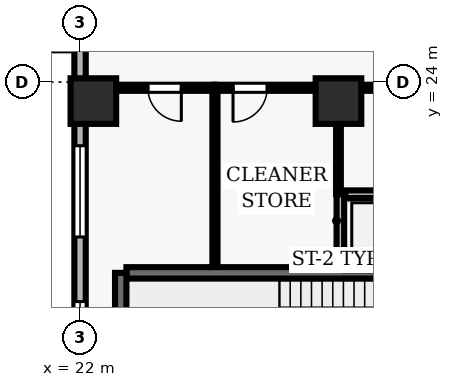
"""IFC4 building model, lengths in metres.
Left out: names, types, materials, properties, quantities, classifications, styles, units other than length and angle.
Written with IfcOpenShell. Run it as: python <this file> out.ifc"""

import sys

from ifc_helpers import new_model, si_unit, direction, frame, frame_2d, origin, origin_2d, place, context, subcontext, project, spatial, rectangle, extrude, element, fill, save


model = new_model("IFC4")
c1 = context("Model", 3, precision=1e-05, world=origin(), true_north=direction((0.0, 1.0)))
c2 = subcontext(c1, "Body", "Model", "MODEL_VIEW")
j1 = project(units=[si_unit("LENGTHUNIT", "METRE"), si_unit("PLANEANGLEUNIT", "RADIAN")], contexts=[c1])
p1 = place(None, origin())
s1 = spatial("IfcSite", under=j1, at=p1, CompositionType="ELEMENT")
p2 = place(p1, origin())
s2 = spatial("IfcBuilding", under=s1, at=p2, CompositionType="ELEMENT")
p3 = place(p2, frame((0.0, 0.0, 130.7)))
s3 = spatial("IfcBuildingStorey", under=s2, at=p3, CompositionType="ELEMENT", Elevation=130.7)
for number, where, z_axis, x_axis in (
    (1, (22.35, 23.5, 0.0), (0.0, 0.0, 1.0), (1.0, 0.0, 0.0)),
    (2, (28.8, 23.5, 0.0), (0.0, 0.0, 1.0), (1.0, 0.0, 0.0)),
):
    element("IfcColumn", number, at=place(p3, frame(where, z_axis=z_axis, x_axis=x_axis)), inside=s3, PredefinedType="COLUMN", context=c2, shape_type="SweptSolid", body=[
        extrude(rectangle(XDim=1.2, YDim=1.2, at=origin_2d()), origin(), (0.0, 0.0, 1.0), 3.9),
    ])
p4 = place(p3, frame((22.0, 46.1, 0.0), z_axis=(0.0, 0.0, 1.0), x_axis=(0.0, -1.0, 0.0)))
e3 = element("IfcWall", 3, at=p4, inside=s3, PredefinedType="SOLIDWALL", context=c2, shape_type="SweptSolid", body=[
    extrude(rectangle(XDim=43.6, YDim=0.3, at=frame_2d((21.8, 0.0))), origin(), (0.0, 0.0, 1.0), 3.69),
])
p5 = place(p4, frame((12.7, 0.0, 0.0)))
e4 = element("IfcOpeningElement", 4, at=p5, cuts=e3, PredefinedType="OPENING", context=c2, shape_type="SweptSolid", body=[
    extrude(rectangle(XDim=1.0, YDim=2.2, at=frame_2d((0.5, 1.1))), frame((0.0, 0.16, 0.0), z_axis=(0.0, -1.0, 0.0), x_axis=(1.0, 0.0, 0.0)), (0.0, 0.0, 1.0), 0.32),
])
p6 = place(p4, frame((1.525, 0.0, 0.9)))
e5 = element("IfcOpeningElement", 5, at=p6, cuts=e3, PredefinedType="OPENING", context=c2, shape_type="SweptSolid", body=[
    extrude(rectangle(XDim=2.4, YDim=1.8, at=frame_2d((1.2, 0.9))), frame((0.0, 0.16, 0.0), z_axis=(0.0, -1.0, 0.0), x_axis=(1.0, 0.0, 0.0)), (0.0, 0.0, 1.0), 0.32),
])
p7 = place(p4, frame((6.075, 0.0, 0.9)))
e6 = element("IfcOpeningElement", 6, at=p7, cuts=e3, PredefinedType="OPENING", context=c2, shape_type="SweptSolid", body=[
    extrude(rectangle(XDim=2.4, YDim=1.8, at=frame_2d((1.2, 0.9))), frame((0.0, 0.16, 0.0), z_axis=(0.0, -1.0, 0.0), x_axis=(1.0, 0.0, 0.0)), (0.0, 0.0, 1.0), 0.32),
])
p8 = place(p4, frame((16.975, 0.0, 0.9)))
e7 = element("IfcOpeningElement", 7, at=p8, cuts=e3, PredefinedType="OPENING", context=c2, shape_type="SweptSolid", body=[
    extrude(rectangle(XDim=2.4, YDim=1.8, at=frame_2d((1.2, 0.9))), frame((0.0, 0.16, 0.0), z_axis=(0.0, -1.0, 0.0), x_axis=(1.0, 0.0, 0.0)), (0.0, 0.0, 1.0), 0.32),
])
p9 = place(p4, frame((23.775, 0.0, 0.9)))
e8 = element("IfcOpeningElement", 8, at=p9, cuts=e3, PredefinedType="OPENING", context=c2, shape_type="SweptSolid", body=[
    extrude(rectangle(XDim=2.4, YDim=1.8, at=frame_2d((1.2, 0.9))), frame((0.0, 0.16, 0.0), z_axis=(0.0, -1.0, 0.0), x_axis=(1.0, 0.0, 0.0)), (0.0, 0.0, 1.0), 0.32),
])
p10 = place(p4, frame((27.875, 0.0, 0.9)))
e9 = element("IfcOpeningElement", 9, at=p10, cuts=e3, PredefinedType="OPENING", context=c2, shape_type="SweptSolid", body=[
    extrude(rectangle(XDim=2.4, YDim=1.8, at=frame_2d((1.2, 0.9))), frame((0.0, 0.16, 0.0), z_axis=(0.0, -1.0, 0.0), x_axis=(1.0, 0.0, 0.0)), (0.0, 0.0, 1.0), 0.32),
])
p11 = place(p4, frame((34.225, 0.0, 0.9)))
e10 = element("IfcOpeningElement", 10, at=p11, cuts=e3, PredefinedType="OPENING", context=c2, shape_type="SweptSolid", body=[
    extrude(rectangle(XDim=2.4, YDim=1.8, at=frame_2d((1.2, 0.9))), frame((0.0, 0.16, 0.0), z_axis=(0.0, -1.0, 0.0), x_axis=(1.0, 0.0, 0.0)), (0.0, 0.0, 1.0), 0.32),
])
p12 = place(p3, frame((31.58, 18.98, 0.0), z_axis=(0.0, 0.0, 1.0), x_axis=(-1.0, 0.0, 0.0)))
e11 = element("IfcWall", 11, at=p12, inside=s3, PredefinedType="SHEAR", context=c2, shape_type="SweptSolid", body=[
    extrude(rectangle(XDim=8.36, YDim=0.3, at=frame_2d((4.18, 0.0))), origin(), (0.0, 0.0, 1.0), 3.69),
])
p13 = place(p3, frame((23.07, 18.98, 0.0), z_axis=(0.0, 0.0, 1.0), x_axis=(0.0, -1.0, 0.0)))
e12 = element("IfcWall", 12, at=p13, inside=s3, PredefinedType="SHEAR", context=c2, shape_type="SweptSolid", body=[
    extrude(rectangle(XDim=3.51, YDim=0.3, at=frame_2d((1.755, 0.0))), origin(), (0.0, 0.0, 1.0), 3.69),
])
p14 = place(p3, frame((28.85, 21.05, 0.0), z_axis=(0.0, 0.0, 1.0), x_axis=(0.0, -1.0, 0.0)))
e13 = element("IfcWall", 13, at=p14, inside=s3, PredefinedType="SOLIDWALL", context=c2, shape_type="SweptSolid", body=[
    extrude(rectangle(XDim=1.9, YDim=0.2, at=frame_2d((0.95, 0.0))), origin(), (0.0, 0.0, 1.0), 3.69),
])
for number, where, z_axis, x_axis in (
    (14, (28.98, 19.15, 0.0), (0.0, 0.0, 1.0), (1.0, 0.0, 0.0)),
    (15, (31.42, 21.05, 0.0), (0.0, 0.0, 1.0), (-1.0, 0.0, 0.0)),
):
    element("IfcWall", number, at=place(p3, frame(where, z_axis=z_axis, x_axis=x_axis)), inside=s3, PredefinedType="SOLIDWALL", context=c2, shape_type="SweptSolid", body=[
        extrude(rectangle(XDim=2.44, YDim=0.2, at=frame_2d((1.22, 0.0))), origin(), (0.0, 0.0, 1.0), 3.69),
    ])
p15 = place(p3, frame((25.55, 23.85, 0.0), z_axis=(0.0, 0.0, 1.0), x_axis=(-1.0, 0.0, 0.0)))
e16 = element("IfcWall", 16, at=p15, inside=s3, PredefinedType="PARTITIONING", context=c2, shape_type="SweptSolid", body=[
    extrude(rectangle(XDim=3.35, YDim=0.16, at=frame_2d((1.675, 0.0))), origin(), (0.0, 0.0, 1.0), 3.073),
])
p16 = place(p15, frame((0.885, 0.0, 0.0)))
e17 = element("IfcOpeningElement", 17, at=p16, cuts=e16, PredefinedType="OPENING", context=c2, shape_type="SweptSolid", body=[
    extrude(rectangle(XDim=0.88, YDim=2.1, at=frame_2d((0.44, 1.05))), frame((0.0, 0.09, 0.0), z_axis=(0.0, -1.0, 0.0), x_axis=(1.0, 0.0, 0.0)), (0.0, 0.0, 1.0), 0.18),
])
p17 = place(p3, frame((28.8, 23.85, 0.0), z_axis=(0.0, 0.0, 1.0), x_axis=(-1.0, 0.0, 0.0)))
e18 = element("IfcWall", 18, at=p17, inside=s3, PredefinedType="PARTITIONING", context=c2, shape_type="SweptSolid", body=[
    extrude(rectangle(XDim=3.25, YDim=0.16, at=frame_2d((1.625, 0.0))), origin(), (0.0, 0.0, 1.0), 3.073),
])
p18 = place(p17, frame((1.875, 0.0, 0.0)))
e19 = element("IfcOpeningElement", 19, at=p18, cuts=e18, PredefinedType="OPENING", context=c2, shape_type="SweptSolid", body=[
    extrude(rectangle(XDim=0.9, YDim=2.1, at=frame_2d((0.45, 1.05))), frame((0.0, 0.09, 0.0), z_axis=(0.0, -1.0, 0.0), x_axis=(1.0, 0.0, 0.0)), (0.0, 0.0, 1.0), 0.18),
])
p19 = place(p3, frame((31.65, 23.85, 0.0), z_axis=(0.0, 0.0, 1.0), x_axis=(-1.0, 0.0, 0.0)))
e20 = element("IfcWall", 20, at=p19, inside=s3, PredefinedType="PARTITIONING", context=c2, shape_type="SweptSolid", body=[
    extrude(rectangle(XDim=2.85, YDim=0.16, at=frame_2d((1.425, 0.0))), origin(), (0.0, 0.0, 1.0), 3.073),
])
p20 = place(p3, frame((25.55, 19.16, 0.0), z_axis=(0.0, 0.0, 1.0), x_axis=(0.0, 1.0, 0.0)))
e21 = element("IfcWall", 21, at=p20, inside=s3, PredefinedType="PARTITIONING", context=c2, shape_type="SweptSolid", body=[
    extrude(rectangle(XDim=4.615, YDim=0.135, at=frame_2d((2.308, 0.0))), origin(), (0.0, 0.0, 1.0), 3.69),
])
p21 = place(p3, frame((28.8, 23.775, 0.0), z_axis=(0.0, 0.0, 1.0), x_axis=(0.0, -1.0, 0.0)))
e22 = element("IfcWall", 22, at=p21, inside=s3, PredefinedType="PARTITIONING", context=c2, shape_type="SweptSolid", body=[
    extrude(rectangle(XDim=2.725, YDim=0.125, at=frame_2d((1.362, 0.0))), origin(), (0.0, 0.0, 1.0), 3.69),
])
p22 = place(p9, origin())
e23 = element("IfcWindow", 23, at=p22, inside=s3, PartitioningType="SINGLE_PANEL", PredefinedType="WINDOW", context=c2, shape_type="SweptSolid", body=[
    extrude(rectangle(XDim=2.4, YDim=1.8, at=frame_2d((1.2, 0.9))), frame((0.0, 0.03, 0.0), z_axis=(0.0, -1.0, 0.0), x_axis=(1.0, 0.0, 0.0)), (0.0, 0.0, 1.0), 0.06),
])
fill(e8, e23)
p23 = place(p10, origin())
e24 = element("IfcWindow", 24, at=p23, inside=s3, PartitioningType="SINGLE_PANEL", PredefinedType="WINDOW", context=c2, shape_type="SweptSolid", body=[
    extrude(rectangle(XDim=2.4, YDim=1.8, at=frame_2d((1.2, 0.9))), frame((0.0, 0.03, 0.0), z_axis=(0.0, -1.0, 0.0), x_axis=(1.0, 0.0, 0.0)), (0.0, 0.0, 1.0), 0.06),
])
fill(e9, e24)
p24 = place(p16, origin())
e25 = element("IfcDoor", 25, at=p24, inside=s3, OperationType="SINGLE_SWING_LEFT", PredefinedType="DOOR", context=c2, shape_type="SweptSolid", body=[
    extrude(rectangle(XDim=0.88, YDim=2.1, at=frame_2d((0.44, 1.05))), frame((0.0, 0.025, 0.0), z_axis=(0.0, -1.0, 0.0), x_axis=(1.0, 0.0, 0.0)), (0.0, 0.0, 1.0), 0.05),
])
fill(e17, e25)
p25 = place(p18, origin())
e26 = element("IfcDoor", 26, at=p25, inside=s3, OperationType="SINGLE_SWING_RIGHT", PredefinedType="DOOR", context=c2, shape_type="SweptSolid", body=[
    extrude(rectangle(XDim=0.9, YDim=2.1, at=frame_2d((0.45, 1.05))), frame((0.0, 0.025, 0.0), z_axis=(0.0, -1.0, 0.0), x_axis=(1.0, 0.0, 0.0)), (0.0, 0.0, 1.0), 0.05),
])
fill(e19, e26)
save(model, sys.argv[1])
